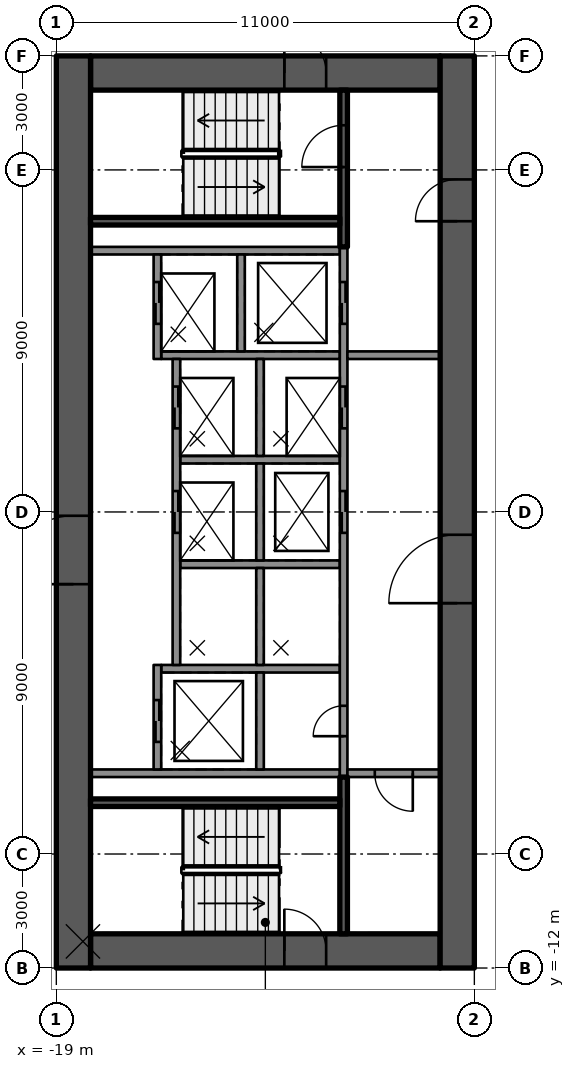
"""IFC4 building model, lengths in metres.
Left out: names, types, materials, properties, quantities, classifications, styles, units other than length and angle.
Written with IfcOpenShell. Run it as: python <this file> out.ifc"""

import sys

from ifc_helpers import new_model, si_unit, direction, frame, frame_2d, origin, place, context, subcontext, project, spatial, rectangle, extrude, element, fill, save


model = new_model("IFC4")
c1 = context("Model", 3, precision=1e-05, world=origin(), true_north=direction((0.0, 1.0)))
c2 = subcontext(c1, "Body", "Model", "MODEL_VIEW")
j1 = project(units=[si_unit("LENGTHUNIT", "METRE"), si_unit("PLANEANGLEUNIT", "RADIAN")], contexts=[c1])
p1 = place(None, origin())
s1 = spatial("IfcSite", under=j1, at=p1, CompositionType="ELEMENT")
p2 = place(p1, origin())
s2 = spatial("IfcBuilding", under=s1, at=p2, CompositionType="ELEMENT")
p3 = place(p2, frame((0.0, 0.0, 102.2)))
s3 = spatial("IfcBuildingStorey", under=s2, at=p3, CompositionType="ELEMENT", Elevation=102.2)
p4 = place(p3, frame((-18.1, 11.55, 0.0), z_axis=(0.0, 0.0, 1.0), x_axis=(1.0, 0.0, 0.0)))
e1 = element("IfcWall", 1, at=p4, inside=s3, PredefinedType="SHEAR", context=c2, shape_type="SweptSolid", body=[
    extrude(rectangle(XDim=9.2, YDim=0.9, at=frame_2d((4.6, 0.0))), origin(), (0.0, 0.0, 1.0), 3.5),
])
p5 = place(p4, frame((5.1, 0.0, 0.0)))
e2 = element("IfcOpeningElement", 2, at=p5, cuts=e1, PredefinedType="OPENING", context=c2, shape_type="SweptSolid", body=[
    extrude(rectangle(XDim=1.1, YDim=2.1, at=frame_2d((0.55, 1.05))), frame((0.0, 0.46, 0.0), z_axis=(0.0, -1.0, 0.0), x_axis=(1.0, 0.0, 0.0)), (0.0, 0.0, 1.0), 0.92),
])
p6 = place(p3, frame((-18.1, -11.55, 0.0), z_axis=(0.0, 0.0, 1.0), x_axis=(1.0, 0.0, 0.0)))
e3 = element("IfcWall", 3, at=p6, inside=s3, PredefinedType="SHEAR", context=c2, shape_type="SweptSolid", body=[
    extrude(rectangle(XDim=9.2, YDim=0.9, at=frame_2d((4.6, 0.0))), origin(), (0.0, 0.0, 1.0), 3.5),
])
p7 = place(p6, frame((5.1, 0.0, 0.0)))
e4 = element("IfcOpeningElement", 4, at=p7, cuts=e3, PredefinedType="OPENING", context=c2, shape_type="SweptSolid", body=[
    extrude(rectangle(XDim=1.1, YDim=2.1, at=frame_2d((0.55, 1.05))), frame((0.0, 0.46, 0.0), z_axis=(0.0, -1.0, 0.0), x_axis=(1.0, 0.0, 0.0)), (0.0, 0.0, 1.0), 0.92),
])
p8 = place(p3, frame((-18.55, -12.0, 0.0), z_axis=(0.0, 0.0, 1.0), x_axis=(0.0, 1.0, 0.0)))
e5 = element("IfcWall", 5, at=p8, inside=s3, PredefinedType="SHEAR", context=c2, shape_type="SweptSolid", body=[
    extrude(rectangle(XDim=24.0, YDim=0.9, at=frame_2d((12.0, 0.0))), origin(), (0.0, 0.0, 1.0), 3.5),
])
p9 = place(p8, frame((10.1, 0.0, 0.0)))
e6 = element("IfcOpeningElement", 6, at=p9, cuts=e5, PredefinedType="OPENING", context=c2, shape_type="SweptSolid", body=[
    extrude(rectangle(XDim=1.8, YDim=2.1, at=frame_2d((0.9, 1.05))), frame((0.0, 0.46, 0.0), z_axis=(0.0, -1.0, 0.0), x_axis=(1.0, 0.0, 0.0)), (0.0, 0.0, 1.0), 0.92),
])
p10 = place(p3, frame((-8.45, -12.0, 0.0), z_axis=(0.0, 0.0, 1.0), x_axis=(0.0, 1.0, 0.0)))
e7 = element("IfcWall", 7, at=p10, inside=s3, PredefinedType="SHEAR", context=c2, shape_type="SweptSolid", body=[
    extrude(rectangle(XDim=24.0, YDim=0.9, at=frame_2d((12.0, 0.0))), origin(), (0.0, 0.0, 1.0), 3.5),
])
p11 = place(p10, frame((9.6, 0.0, 0.0)))
e8 = element("IfcOpeningElement", 8, at=p11, cuts=e7, PredefinedType="OPENING", context=c2, shape_type="SweptSolid", body=[
    extrude(rectangle(XDim=1.8, YDim=2.1, at=frame_2d((0.9, 1.05))), frame((0.0, 0.46, 0.0), z_axis=(0.0, -1.0, 0.0), x_axis=(1.0, 0.0, 0.0)), (0.0, 0.0, 1.0), 0.92),
])
p12 = place(p10, frame((19.65, 0.0, 0.0)))
e9 = element("IfcOpeningElement", 9, at=p12, cuts=e7, PredefinedType="OPENING", context=c2, shape_type="SweptSolid", body=[
    extrude(rectangle(XDim=1.1, YDim=2.1, at=frame_2d((0.55, 1.05))), frame((0.0, 0.46, 0.0), z_axis=(0.0, -1.0, 0.0), x_axis=(1.0, 0.0, 0.0)), (0.0, 0.0, 1.0), 0.92),
])
for number, where, z_axis, x_axis in (
    (10, (-11.54, 6.875, 0.0), (0.0, 0.0, 1.0), (-1.0, 0.0, 0.0)),
    (11, (-11.54, -6.875, 0.0), (0.0, 0.0, 1.0), (-1.0, 0.0, 0.0)),
):
    element("IfcWall", number, at=place(p3, frame(where, z_axis=z_axis, x_axis=x_axis)), inside=s3, PredefinedType="SOLIDWALL", context=c2, shape_type="SweptSolid", body=[
        extrude(rectangle(XDim=6.56, YDim=0.2, at=frame_2d((3.28, 0.0))), origin(), (0.0, 0.0, 1.0), 3.09),
    ])
p13 = place(p3, frame((-11.54, -4.125, 0.0), z_axis=(0.0, 0.0, 1.0), x_axis=(-1.0, 0.0, 0.0)))
e12 = element("IfcWall", 12, at=p13, inside=s3, PredefinedType="SOLIDWALL", context=c2, shape_type="SweptSolid", body=[
    extrude(rectangle(XDim=4.7, YDim=0.2, at=frame_2d((2.35, 0.0))), origin(), (0.0, 0.0, 1.0), 3.09),
])
for number, where, z_axis, x_axis in (
    (13, (-11.54, -1.375, 0.0), (0.0, 0.0, 1.0), (-1.0, 0.0, 0.0)),
    (14, (-11.54, 1.375, 0.0), (0.0, 0.0, 1.0), (-1.0, 0.0, 0.0)),
):
    element("IfcWall", number, at=place(p3, frame(where, z_axis=z_axis, x_axis=x_axis)), inside=s3, PredefinedType="SOLIDWALL", context=c2, shape_type="SweptSolid", body=[
        extrude(rectangle(XDim=4.2, YDim=0.2, at=frame_2d((2.1, 0.0))), origin(), (0.0, 0.0, 1.0), 3.09),
    ])
p14 = place(p3, frame((-11.54, 4.125, 0.0), z_axis=(0.0, 0.0, 1.0), x_axis=(-1.0, 0.0, 0.0)))
e15 = element("IfcWall", 15, at=p14, inside=s3, PredefinedType="SOLIDWALL", context=c2, shape_type="SweptSolid", body=[
    extrude(rectangle(XDim=4.7, YDim=0.2, at=frame_2d((2.35, 0.0))), origin(), (0.0, 0.0, 1.0), 3.09),
])
p15 = place(p3, frame((-11.44, -6.975, 0.0), z_axis=(0.0, 0.0, 1.0), x_axis=(0.0, 1.0, 0.0)))
e16 = element("IfcWall", 16, at=p15, inside=s3, PredefinedType="SOLIDWALL", context=c2, shape_type="SweptSolid", body=[
    extrude(rectangle(XDim=13.95, YDim=0.2, at=frame_2d((6.975, 0.0))), origin(), (0.0, 0.0, 1.0), 3.09),
])
p16 = place(p15, frame((6.425, 0.0, 0.0)))
e17 = element("IfcOpeningElement", 17, at=p16, cuts=e16, PredefinedType="OPENING", context=c2, shape_type="SweptSolid", body=[
    extrude(rectangle(XDim=1.1, YDim=2.1, at=frame_2d((0.55, 1.05))), frame((0.0, 0.11, 0.0), z_axis=(0.0, -1.0, 0.0), x_axis=(1.0, 0.0, 0.0)), (0.0, 0.0, 1.0), 0.22),
])
p17 = place(p15, frame((9.175, 0.0, 0.0)))
e18 = element("IfcOpeningElement", 18, at=p17, cuts=e16, PredefinedType="OPENING", context=c2, shape_type="SweptSolid", body=[
    extrude(rectangle(XDim=1.1, YDim=2.1, at=frame_2d((0.55, 1.05))), frame((0.0, 0.11, 0.0), z_axis=(0.0, -1.0, 0.0), x_axis=(1.0, 0.0, 0.0)), (0.0, 0.0, 1.0), 0.22),
])
p18 = place(p15, frame((11.925, 0.0, 0.0)))
e19 = element("IfcOpeningElement", 19, at=p18, cuts=e16, PredefinedType="OPENING", context=c2, shape_type="SweptSolid", body=[
    extrude(rectangle(XDim=1.1, YDim=2.1, at=frame_2d((0.55, 1.05))), frame((0.0, 0.11, 0.0), z_axis=(0.0, -1.0, 0.0), x_axis=(1.0, 0.0, 0.0)), (0.0, 0.0, 1.0), 0.22),
])
p19 = place(p15, frame((1.075, 0.0, 0.0)))
e20 = element("IfcOpeningElement", 20, at=p19, cuts=e16, PredefinedType="OPENING", context=c2, shape_type="SweptSolid", body=[
    extrude(rectangle(XDim=0.8, YDim=2.1, at=frame_2d((0.4, 1.05))), frame((0.0, 0.11, 0.0), z_axis=(0.0, -1.0, 0.0), x_axis=(1.0, 0.0, 0.0)), (0.0, 0.0, 1.0), 0.22),
])
for number, where, z_axis, x_axis in (
    (21, (-13.64, -6.775, 0.0), (0.0, 0.0, 1.0), (0.0, 1.0, 0.0)),
    (22, (-13.64, -4.025, 0.0), (0.0, 0.0, 1.0), (0.0, 1.0, 0.0)),
    (23, (-13.64, -1.275, 0.0), (0.0, 0.0, 1.0), (0.0, 1.0, 0.0)),
    (24, (-13.64, 1.475, 0.0), (0.0, 0.0, 1.0), (0.0, 1.0, 0.0)),
    (25, (-14.14, 4.225, 0.0), (0.0, 0.0, 1.0), (0.0, 1.0, 0.0)),
):
    element("IfcWall", number, at=place(p3, frame(where, z_axis=z_axis, x_axis=x_axis)), inside=s3, PredefinedType="SOLIDWALL", context=c2, shape_type="SweptSolid", body=[
        extrude(rectangle(XDim=2.55, YDim=0.2, at=frame_2d((1.275, 0.0))), origin(), (0.0, 0.0, 1.0), 3.09),
    ])
p20 = place(p3, frame((-16.34, -6.775, 0.0), z_axis=(0.0, 0.0, 1.0), x_axis=(0.0, 1.0, 0.0)))
e26 = element("IfcWall", 26, at=p20, inside=s3, PredefinedType="SOLIDWALL", context=c2, shape_type="SweptSolid", body=[
    extrude(rectangle(XDim=2.75, YDim=0.2, at=frame_2d((1.375, 0.0))), origin(), (0.0, 0.0, 1.0), 3.09),
])
p21 = place(p20, frame((0.725, 0.0, 0.0)))
e27 = element("IfcOpeningElement", 27, at=p21, cuts=e26, PredefinedType="OPENING", context=c2, shape_type="SweptSolid", body=[
    extrude(rectangle(XDim=1.1, YDim=2.1, at=frame_2d((0.55, 1.05))), frame((0.0, 0.11, 0.0), z_axis=(0.0, -1.0, 0.0), x_axis=(1.0, 0.0, 0.0)), (0.0, 0.0, 1.0), 0.22),
])
p22 = place(p3, frame((-15.84, -4.025, 0.0), z_axis=(0.0, 0.0, 1.0), x_axis=(0.0, 1.0, 0.0)))
e28 = element("IfcWall", 28, at=p22, inside=s3, PredefinedType="SOLIDWALL", context=c2, shape_type="SweptSolid", body=[
    extrude(rectangle(XDim=8.05, YDim=0.2, at=frame_2d((4.025, 0.0))), origin(), (0.0, 0.0, 1.0), 3.09),
])
p23 = place(p22, frame((3.475, 0.0, 0.0)))
e29 = element("IfcOpeningElement", 29, at=p23, cuts=e28, PredefinedType="OPENING", context=c2, shape_type="SweptSolid", body=[
    extrude(rectangle(XDim=1.1, YDim=2.1, at=frame_2d((0.55, 1.05))), frame((0.0, 0.11, 0.0), z_axis=(0.0, -1.0, 0.0), x_axis=(1.0, 0.0, 0.0)), (0.0, 0.0, 1.0), 0.22),
])
p24 = place(p22, frame((6.225, 0.0, 0.0)))
e30 = element("IfcOpeningElement", 30, at=p24, cuts=e28, PredefinedType="OPENING", context=c2, shape_type="SweptSolid", body=[
    extrude(rectangle(XDim=1.1, YDim=2.1, at=frame_2d((0.55, 1.05))), frame((0.0, 0.11, 0.0), z_axis=(0.0, -1.0, 0.0), x_axis=(1.0, 0.0, 0.0)), (0.0, 0.0, 1.0), 0.22),
])
p25 = place(p3, frame((-16.34, 4.025, 0.0), z_axis=(0.0, 0.0, 1.0), x_axis=(0.0, 1.0, 0.0)))
e31 = element("IfcWall", 31, at=p25, inside=s3, PredefinedType="SOLIDWALL", context=c2, shape_type="SweptSolid", body=[
    extrude(rectangle(XDim=2.75, YDim=0.2, at=frame_2d((1.375, 0.0))), origin(), (0.0, 0.0, 1.0), 3.09),
])
p26 = place(p25, frame((0.925, 0.0, 0.0)))
e32 = element("IfcOpeningElement", 32, at=p26, cuts=e31, PredefinedType="OPENING", context=c2, shape_type="SweptSolid", body=[
    extrude(rectangle(XDim=1.1, YDim=2.1, at=frame_2d((0.55, 1.05))), frame((0.0, 0.11, 0.0), z_axis=(0.0, -1.0, 0.0), x_axis=(1.0, 0.0, 0.0)), (0.0, 0.0, 1.0), 0.22),
])
p27 = place(p3, frame((-11.44, 6.975, 0.0), z_axis=(0.0, 0.0, 1.0), x_axis=(0.0, 1.0, 0.0)))
e33 = element("IfcWall", 33, at=p27, inside=s3, PredefinedType="SOLIDWALL", context=c2, shape_type="SweptSolid", body=[
    extrude(rectangle(XDim=4.125, YDim=0.2, at=frame_2d((2.062, 0.0))), origin(), (0.0, 0.0, 1.0), 3.09),
])
p28 = place(p27, frame((2.1, 0.0, 0.0)))
e34 = element("IfcOpeningElement", 34, at=p28, cuts=e33, PredefinedType="OPENING", context=c2, shape_type="SweptSolid", body=[
    extrude(rectangle(XDim=1.1, YDim=2.1, at=frame_2d((0.55, 1.05))), frame((0.0, 0.11, 0.0), z_axis=(0.0, -1.0, 0.0), x_axis=(1.0, 0.0, 0.0)), (0.0, 0.0, 1.0), 0.22),
])
p29 = place(p3, frame((-11.54, 7.65, 0.0), z_axis=(0.0, 0.0, 1.0), x_axis=(-1.0, 0.0, 0.0)))
e35 = element("IfcWall", 35, at=p29, inside=s3, PredefinedType="SOLIDWALL", context=c2, shape_type="SweptSolid", body=[
    extrude(rectangle(XDim=6.56, YDim=0.2, at=frame_2d((3.28, 0.0))), origin(), (0.0, 0.0, 1.0), 3.09),
])
p30 = place(p3, frame((-11.44, -11.1, 0.0), z_axis=(0.0, 0.0, 1.0), x_axis=(0.0, 1.0, 0.0)))
e36 = element("IfcWall", 36, at=p30, inside=s3, PredefinedType="SOLIDWALL", context=c2, shape_type="SweptSolid", body=[
    extrude(rectangle(XDim=4.125, YDim=0.2, at=frame_2d((2.062, 0.0))), origin(), (0.0, 0.0, 1.0), 3.09),
])
p31 = place(p3, frame((-11.54, -7.65, 0.0), z_axis=(0.0, 0.0, 1.0), x_axis=(-1.0, 0.0, 0.0)))
e37 = element("IfcWall", 37, at=p31, inside=s3, PredefinedType="SOLIDWALL", context=c2, shape_type="SweptSolid", body=[
    extrude(rectangle(XDim=6.56, YDim=0.2, at=frame_2d((3.28, 0.0))), origin(), (0.0, 0.0, 1.0), 3.09),
])
p32 = place(p3, frame((-8.9, 4.125, 0.0), z_axis=(0.0, 0.0, 1.0), x_axis=(-1.0, 0.0, 0.0)))
e38 = element("IfcWall", 38, at=p32, inside=s3, PredefinedType="PARTITIONING", context=c2, shape_type="SweptSolid", body=[
    extrude(rectangle(XDim=2.44, YDim=0.2, at=frame_2d((1.22, 0.0))), origin(), (0.0, 0.0, 1.0), 3.09),
])
p33 = place(p3, frame((-8.9, -6.875, 0.0), z_axis=(0.0, 0.0, 1.0), x_axis=(-1.0, 0.0, 0.0)))
e39 = element("IfcWall", 39, at=p33, inside=s3, PredefinedType="PARTITIONING", context=c2, shape_type="SweptSolid", body=[
    extrude(rectangle(XDim=2.44, YDim=0.2, at=frame_2d((1.22, 0.0))), origin(), (0.0, 0.0, 1.0), 3.09),
])
p34 = place(p33, frame((0.72, 0.0, 0.0)))
e40 = element("IfcOpeningElement", 40, at=p34, cuts=e39, PredefinedType="OPENING", context=c2, shape_type="SweptSolid", body=[
    extrude(rectangle(XDim=1.0, YDim=2.1, at=frame_2d((0.5, 1.05))), frame((0.0, 0.11, 0.0), z_axis=(0.0, -1.0, 0.0), x_axis=(1.0, 0.0, 0.0)), (0.0, 0.0, 1.0), 0.22),
])
p35 = place(p21, origin())
e41 = element("IfcDoor", 41, at=p35, inside=s3, OperationType="DOUBLE_DOOR_SLIDING", PredefinedType="DOOR", context=c2, shape_type="SweptSolid", body=[
    extrude(rectangle(XDim=1.1, YDim=2.1, at=frame_2d((0.55, 1.05))), frame((0.0, 0.025, 0.0), z_axis=(0.0, -1.0, 0.0), x_axis=(1.0, 0.0, 0.0)), (0.0, 0.0, 1.0), 0.05),
])
fill(e27, e41)
p36 = place(p16, origin())
e42 = element("IfcDoor", 42, at=p36, inside=s3, OperationType="DOUBLE_DOOR_SLIDING", PredefinedType="DOOR", context=c2, shape_type="SweptSolid", body=[
    extrude(rectangle(XDim=1.1, YDim=2.1, at=frame_2d((0.55, 1.05))), frame((0.0, 0.025, 0.0), z_axis=(0.0, -1.0, 0.0), x_axis=(1.0, 0.0, 0.0)), (0.0, 0.0, 1.0), 0.05),
])
fill(e17, e42)
p37 = place(p23, origin())
e43 = element("IfcDoor", 43, at=p37, inside=s3, OperationType="DOUBLE_DOOR_SLIDING", PredefinedType="DOOR", context=c2, shape_type="SweptSolid", body=[
    extrude(rectangle(XDim=1.1, YDim=2.1, at=frame_2d((0.55, 1.05))), frame((0.0, 0.025, 0.0), z_axis=(0.0, -1.0, 0.0), x_axis=(1.0, 0.0, 0.0)), (0.0, 0.0, 1.0), 0.05),
])
fill(e29, e43)
p38 = place(p17, origin())
e44 = element("IfcDoor", 44, at=p38, inside=s3, OperationType="DOUBLE_DOOR_SLIDING", PredefinedType="DOOR", context=c2, shape_type="SweptSolid", body=[
    extrude(rectangle(XDim=1.1, YDim=2.1, at=frame_2d((0.55, 1.05))), frame((0.0, 0.025, 0.0), z_axis=(0.0, -1.0, 0.0), x_axis=(1.0, 0.0, 0.0)), (0.0, 0.0, 1.0), 0.05),
])
fill(e18, e44)
p39 = place(p24, origin())
e45 = element("IfcDoor", 45, at=p39, inside=s3, OperationType="DOUBLE_DOOR_SLIDING", PredefinedType="DOOR", context=c2, shape_type="SweptSolid", body=[
    extrude(rectangle(XDim=1.1, YDim=2.1, at=frame_2d((0.55, 1.05))), frame((0.0, 0.025, 0.0), z_axis=(0.0, -1.0, 0.0), x_axis=(1.0, 0.0, 0.0)), (0.0, 0.0, 1.0), 0.05),
])
fill(e30, e45)
p40 = place(p18, origin())
e46 = element("IfcDoor", 46, at=p40, inside=s3, OperationType="DOUBLE_DOOR_SLIDING", PredefinedType="DOOR", context=c2, shape_type="SweptSolid", body=[
    extrude(rectangle(XDim=1.1, YDim=2.1, at=frame_2d((0.55, 1.05))), frame((0.0, 0.025, 0.0), z_axis=(0.0, -1.0, 0.0), x_axis=(1.0, 0.0, 0.0)), (0.0, 0.0, 1.0), 0.05),
])
fill(e19, e46)
p41 = place(p26, origin())
e47 = element("IfcDoor", 47, at=p41, inside=s3, OperationType="DOUBLE_DOOR_SLIDING", PredefinedType="DOOR", context=c2, shape_type="SweptSolid", body=[
    extrude(rectangle(XDim=1.1, YDim=2.1, at=frame_2d((0.55, 1.05))), frame((0.0, 0.025, 0.0), z_axis=(0.0, -1.0, 0.0), x_axis=(1.0, 0.0, 0.0)), (0.0, 0.0, 1.0), 0.05),
])
fill(e32, e47)
p42 = place(p19, origin())
e48 = element("IfcDoor", 48, at=p42, inside=s3, OperationType="SINGLE_SWING_LEFT", PredefinedType="DOOR", context=c2, shape_type="SweptSolid", body=[
    extrude(rectangle(XDim=0.8, YDim=2.1, at=frame_2d((0.4, 1.05))), frame((0.0, 0.025, 0.0), z_axis=(0.0, -1.0, 0.0), x_axis=(1.0, 0.0, 0.0)), (0.0, 0.0, 1.0), 0.05),
])
fill(e20, e48)
p43 = place(p11, origin())
e49 = element("IfcDoor", 49, at=p43, inside=s3, OperationType="SINGLE_SWING_LEFT", PredefinedType="DOOR", context=c2, shape_type="SweptSolid", body=[
    extrude(rectangle(XDim=1.8, YDim=2.1, at=frame_2d((0.9, 1.05))), frame((0.0, 0.025, 0.0), z_axis=(0.0, -1.0, 0.0), x_axis=(1.0, 0.0, 0.0)), (0.0, 0.0, 1.0), 0.05),
])
fill(e8, e49)
p44 = place(p9, origin())
e50 = element("IfcDoor", 50, at=p44, inside=s3, OperationType="SINGLE_SWING_LEFT", PredefinedType="DOOR", context=c2, shape_type="SweptSolid", body=[
    extrude(rectangle(XDim=1.8, YDim=2.1, at=frame_2d((0.9, 1.05))), frame((0.0, 0.025, 0.0), z_axis=(0.0, -1.0, 0.0), x_axis=(1.0, 0.0, 0.0)), (0.0, 0.0, 1.0), 0.05),
])
fill(e6, e50)
p45 = place(p12, origin())
e51 = element("IfcDoor", 51, at=p45, inside=s3, OperationType="SINGLE_SWING_RIGHT", PredefinedType="DOOR", context=c2, shape_type="SweptSolid", body=[
    extrude(rectangle(XDim=1.1, YDim=2.1, at=frame_2d((0.55, 1.05))), frame((0.0, 0.025, 0.0), z_axis=(0.0, -1.0, 0.0), x_axis=(1.0, 0.0, 0.0)), (0.0, 0.0, 1.0), 0.05),
])
fill(e9, e51)
p46 = place(p5, origin())
e52 = element("IfcDoor", 52, at=p46, inside=s3, OperationType="SINGLE_SWING_RIGHT", PredefinedType="DOOR", context=c2, shape_type="SweptSolid", body=[
    extrude(rectangle(XDim=1.1, YDim=2.1, at=frame_2d((0.55, 1.05))), frame((0.0, 0.025, 0.0), z_axis=(0.0, -1.0, 0.0), x_axis=(1.0, 0.0, 0.0)), (0.0, 0.0, 1.0), 0.05),
])
fill(e2, e52)
p47 = place(p7, origin())
e53 = element("IfcDoor", 53, at=p47, inside=s3, OperationType="SINGLE_SWING_RIGHT", PredefinedType="DOOR", context=c2, shape_type="SweptSolid", body=[
    extrude(rectangle(XDim=1.1, YDim=2.1, at=frame_2d((0.55, 1.05))), frame((0.0, 0.025, 0.0), z_axis=(0.0, -1.0, 0.0), x_axis=(1.0, 0.0, 0.0)), (0.0, 0.0, 1.0), 0.05),
])
fill(e4, e53)
p48 = place(p28, origin())
e54 = element("IfcDoor", 54, at=p48, inside=s3, OperationType="SINGLE_SWING_RIGHT", PredefinedType="DOOR", context=c2, shape_type="SweptSolid", body=[
    extrude(rectangle(XDim=1.1, YDim=2.1, at=frame_2d((0.55, 1.05))), frame((0.0, 0.025, 0.0), z_axis=(0.0, -1.0, 0.0), x_axis=(1.0, 0.0, 0.0)), (0.0, 0.0, 1.0), 0.05),
])
fill(e34, e54)
p49 = place(p34, origin())
e55 = element("IfcDoor", 55, at=p49, inside=s3, OperationType="SINGLE_SWING_RIGHT", PredefinedType="DOOR", context=c2, shape_type="SweptSolid", body=[
    extrude(rectangle(XDim=1.0, YDim=2.1, at=frame_2d((0.5, 1.05))), frame((0.0, 0.025, 0.0), z_axis=(0.0, -1.0, 0.0), x_axis=(1.0, 0.0, 0.0)), (0.0, 0.0, 1.0), 0.05),
])
fill(e40, e55)
save(model, sys.argv[1])
